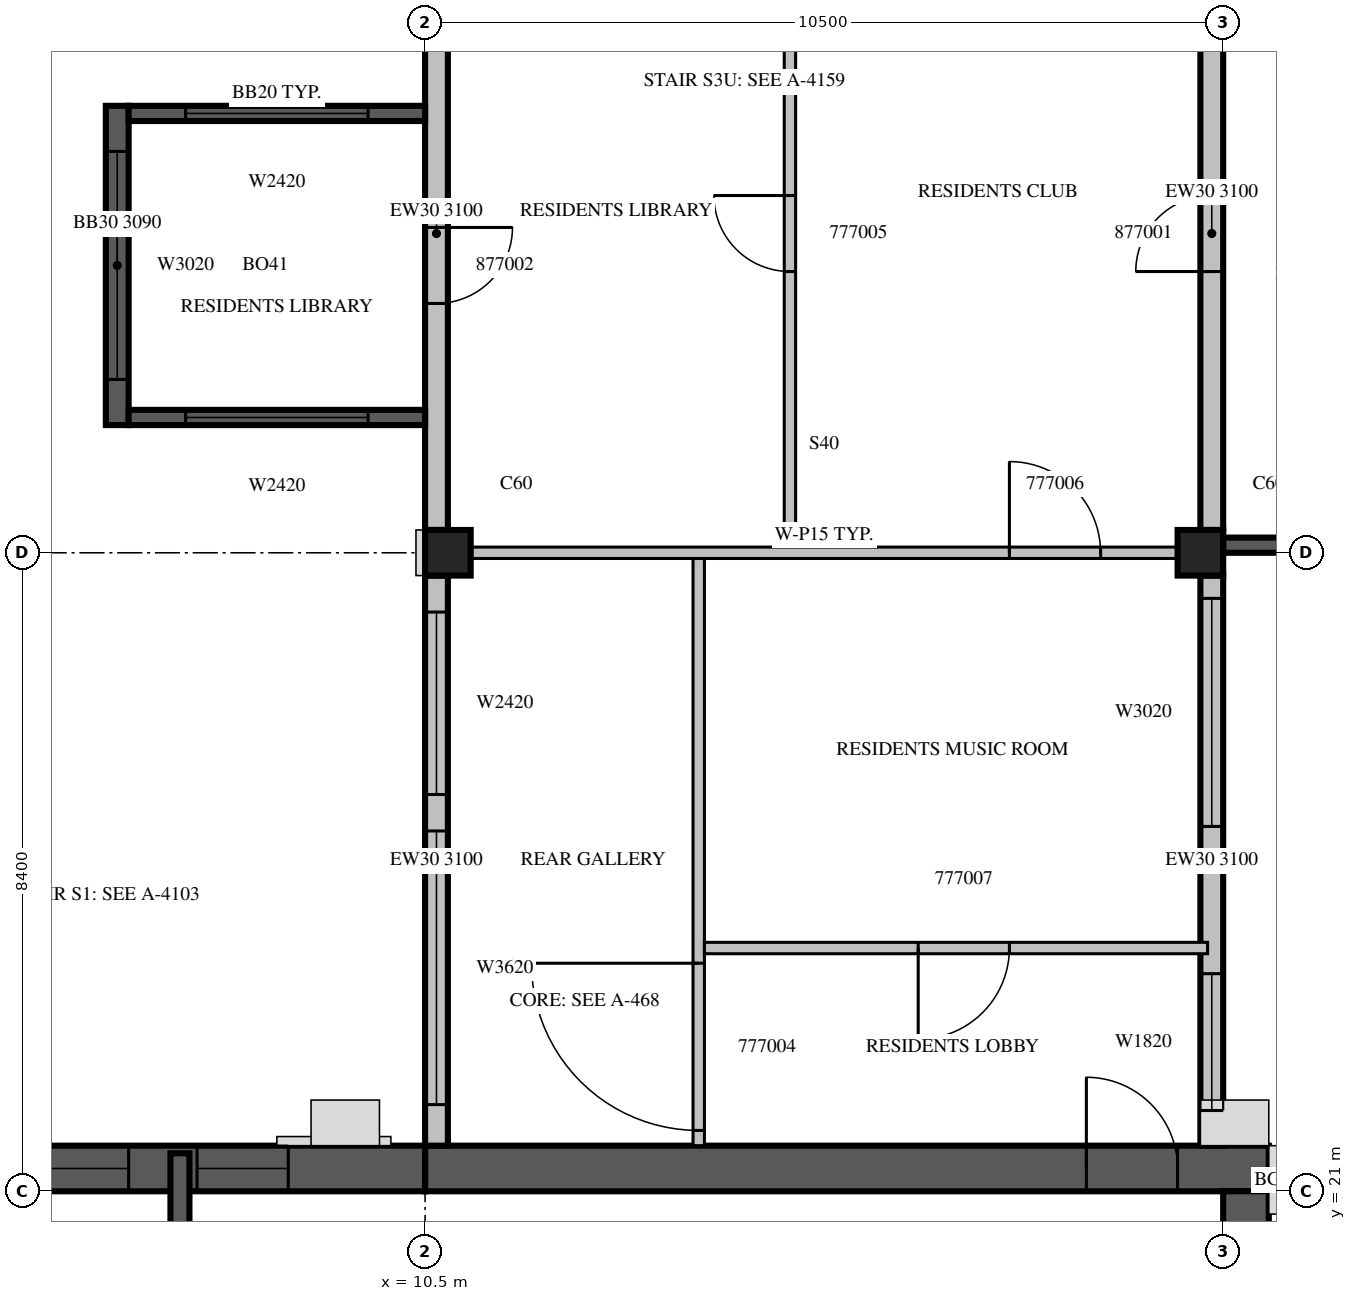
"""IFC4 building model, lengths in metres.
Left out: names, types, materials, properties, quantities, classifications, styles, units other than length and angle.
Written with IfcOpenShell. Run it as: python <this file> out.ifc"""

import sys

from ifc_helpers import new_model, si_unit, direction, frame, frame_2d, origin, origin_2d, place, context, subcontext, project, spatial, rectangle, extrude, source, transform, mapped, element, fill, save


model = new_model("IFC4")
c1 = context("Model", 3, precision=1e-05, world=origin(), true_north=direction((0.0, 1.0)))
c2 = subcontext(c1, "Body", "Model", "MODEL_VIEW")
j1 = project(units=[si_unit("LENGTHUNIT", "METRE"), si_unit("PLANEANGLEUNIT", "RADIAN")], contexts=[c1])
p1 = place(None, origin())
s1 = spatial("IfcSite", under=j1, at=p1, CompositionType="ELEMENT")
p2 = place(p1, origin())
s2 = spatial("IfcBuilding", under=s1, at=p2, CompositionType="ELEMENT")
p3 = place(p2, frame((0.0, 0.0, 330.0)))
s3 = spatial("IfcBuildingStorey", under=s2, at=p3, CompositionType="ELEMENT", Elevation=330.0)
m1 = source(origin(), c2, "Body", "SweptSolid", [
    extrude(rectangle(XDim=0.6, YDim=0.6, at=origin_2d()), origin(), (0.0, 0.0, 1.0), 3.5),
])
for number, where, z_axis, x_axis in (
    (1, (10.8, 29.4, 0.0), (0.0, 0.0, 1.0), (1.0, 0.0, 0.0)),
    (2, (20.7, 29.4, 0.0), (0.0, 0.0, 1.0), (1.0, 0.0, 0.0)),
):
    element("IfcColumn", number, at=place(p3, frame(where, z_axis=z_axis, x_axis=x_axis)), inside=s3, PredefinedType="COLUMN", context=c2, shape_type="MappedRepresentation", body=[
        mapped(m1, transform((0.0, 0.0, 0.0), scale=1.0)),
    ])
m2 = source(origin(), c2, "Body", "SweptSolid", [
    extrude(rectangle(XDim=11.1, YDim=0.6, at=frame_2d((5.55, 0.0))), origin(), (0.0, 0.0, 1.0), 3.5),
])
p4 = place(p3, frame((10.5, 21.3, 0.0), z_axis=(0.0, 0.0, 1.0), x_axis=(1.0, 0.0, 0.0)))
e3 = element("IfcWall", 3, at=p4, inside=s3, PredefinedType="SHEAR", context=c2, shape_type="MappedRepresentation", body=[
    mapped(m2, transform((0.0, 0.0, 0.0), scale=1.0)),
])
m3 = source(origin(), c2, "Body", "SweptSolid", [
    extrude(rectangle(XDim=1.2, YDim=2.1, at=frame_2d((0.6, 1.05))), frame((0.0, 0.31, 0.0), z_axis=(0.0, -1.0, 0.0), x_axis=(1.0, 0.0, 0.0)), (0.0, 0.0, 1.0), 0.62),
])
p5 = place(p4, frame((8.7, 0.0, 0.0)))
e4 = element("IfcOpeningElement", 4, at=p5, cuts=e3, PredefinedType="OPENING", context=c2, shape_type="MappedRepresentation", body=[
    mapped(m3, transform((0.0, 0.0, 0.0), scale=1.0)),
])
m4 = source(origin(), c2, "Body", "SweptSolid", [
    extrude(rectangle(XDim=10.5, YDim=0.6, at=frame_2d((5.25, 0.0))), origin(), (0.0, 0.0, 1.0), 3.5),
])
p6 = place(p3, frame((21.3, 10.5, 0.0), z_axis=(0.0, 0.0, 1.0), x_axis=(0.0, 1.0, 0.0)))
e5 = element("IfcWall", 5, at=p6, inside=s3, PredefinedType="SHEAR", context=c2, shape_type="MappedRepresentation", body=[
    mapped(m4, transform((0.0, 0.0, 0.0), scale=1.0)),
])
m5 = source(origin(), c2, "Body", "SweptSolid", [
    extrude(rectangle(XDim=1.2, YDim=2.4, at=frame_2d((0.6, 1.2))), frame((0.0, 0.31, 0.0), z_axis=(0.0, -1.0, 0.0), x_axis=(1.0, 0.0, 0.0)), (0.0, 0.0, 1.0), 0.62),
])
p7 = place(p6, frame((5.7, 0.0, 0.6)))
e6 = element("IfcOpeningElement", 6, at=p7, cuts=e5, PredefinedType="OPENING", context=c2, shape_type="MappedRepresentation", body=[
    mapped(m5, transform((0.0, 0.0, 0.0), scale=1.0)),
])
m6 = source(origin(), c2, "Body", "SweptSolid", [
    extrude(rectangle(XDim=6.6, YDim=0.6, at=frame_2d((3.3, 0.0))), origin(), (0.0, 0.0, 1.0), 3.5),
])
p8 = place(p3, frame((3.9, 21.3, 0.0), z_axis=(0.0, 0.0, 1.0), x_axis=(1.0, 0.0, 0.0)))
e7 = element("IfcWall", 7, at=p8, inside=s3, PredefinedType="SHEAR", context=c2, shape_type="MappedRepresentation", body=[
    mapped(m6, transform((0.0, 0.0, 0.0), scale=1.0)),
])
p9 = place(p8, frame((1.5, 0.0, 0.6)))
e8 = element("IfcOpeningElement", 8, at=p9, cuts=e7, PredefinedType="OPENING", context=c2, shape_type="MappedRepresentation", body=[
    mapped(m5, transform((0.0, 0.0, 0.0), scale=1.0)),
])
p10 = place(p8, frame((3.6, 0.0, 0.6)))
e9 = element("IfcOpeningElement", 9, at=p10, cuts=e7, PredefinedType="OPENING", context=c2, shape_type="MappedRepresentation", body=[
    mapped(m5, transform((0.0, 0.0, 0.0), scale=1.0)),
])
m7 = source(origin(), c2, "Body", "SweptSolid", [
    extrude(rectangle(XDim=7.5, YDim=0.3, at=frame_2d((3.75, 0.0))), origin(), (0.0, 0.0, 1.0), 3.1),
])
p11 = place(p3, frame((20.85, 21.6, 0.0), z_axis=(0.0, 0.0, 1.0), x_axis=(0.0, 1.0, 0.0)))
e10 = element("IfcWall", 10, at=p11, inside=s3, PredefinedType="STANDARD", context=c2, shape_type="MappedRepresentation", body=[
    mapped(m7, transform((0.0, 0.0, 0.0), scale=1.0)),
])
m8 = source(origin(), c2, "Body", "SweptSolid", [
    extrude(rectangle(XDim=1.8, YDim=2.0, at=frame_2d((0.9, 1.0))), frame((0.0, 0.16, 0.0), z_axis=(0.0, -1.0, 0.0), x_axis=(1.0, 0.0, 0.0)), (0.0, 0.0, 1.0), 0.32),
])
p12 = place(p11, frame((0.463, 0.0, 0.6)))
e11 = element("IfcOpeningElement", 11, at=p12, cuts=e10, PredefinedType="OPENING", context=c2, shape_type="MappedRepresentation", body=[
    mapped(m8, transform((0.0, 0.0, 0.0), scale=1.0)),
])
m9 = source(origin(), c2, "Body", "SweptSolid", [
    extrude(rectangle(XDim=3.0, YDim=2.0, at=frame_2d((1.5, 1.0))), frame((0.0, 0.16, 0.0), z_axis=(0.0, -1.0, 0.0), x_axis=(1.0, 0.0, 0.0)), (0.0, 0.0, 1.0), 0.32),
])
p13 = place(p11, frame((4.2, 0.0, 0.6)))
e12 = element("IfcOpeningElement", 12, at=p13, cuts=e10, PredefinedType="OPENING", context=c2, shape_type="MappedRepresentation", body=[
    mapped(m9, transform((0.0, 0.0, 0.0), scale=1.0)),
])
m10 = source(origin(), c2, "Body", "SweptSolid", [
    extrude(rectangle(XDim=7.8, YDim=0.3, at=frame_2d((3.9, 0.0))), origin(), (0.0, 0.0, 1.0), 3.1),
])
p14 = place(p3, frame((20.85, 29.7, 0.0), z_axis=(0.0, 0.0, 1.0), x_axis=(0.0, 1.0, 0.0)))
e13 = element("IfcWall", 13, at=p14, inside=s3, PredefinedType="STANDARD", context=c2, shape_type="MappedRepresentation", body=[
    mapped(m10, transform((0.0, 0.0, 0.0), scale=1.0)),
])
m11 = source(origin(), c2, "Body", "SweptSolid", [
    extrude(rectangle(XDim=1.0, YDim=2.1, at=frame_2d((0.5, 1.05))), frame((0.0, 0.16, 0.0), z_axis=(0.0, -1.0, 0.0), x_axis=(1.0, 0.0, 0.0)), (0.0, 0.0, 1.0), 0.32),
])
p15 = place(p14, frame((3.4, 0.0, 0.0)))
e14 = element("IfcOpeningElement", 14, at=p15, cuts=e13, PredefinedType="OPENING", context=c2, shape_type="MappedRepresentation", body=[
    mapped(m11, transform((0.0, 0.0, 0.0), scale=1.0)),
])
p16 = place(p3, frame((10.65, 37.5, 0.0), z_axis=(0.0, 0.0, 1.0), x_axis=(0.0, -1.0, 0.0)))
e15 = element("IfcWall", 15, at=p16, inside=s3, PredefinedType="STANDARD", context=c2, shape_type="MappedRepresentation", body=[
    mapped(m10, transform((0.0, 0.0, 0.0), scale=1.0)),
])
p17 = place(p16, frame((3.82, 0.0, 0.0)))
e16 = element("IfcOpeningElement", 16, at=p17, cuts=e15, PredefinedType="OPENING", context=c2, shape_type="MappedRepresentation", body=[
    mapped(m11, transform((0.0, 0.0, 0.0), scale=1.0)),
])
p18 = place(p3, frame((10.65, 29.1, 0.0), z_axis=(0.0, 0.0, 1.0), x_axis=(0.0, -1.0, 0.0)))
e17 = element("IfcWall", 17, at=p18, inside=s3, PredefinedType="STANDARD", context=c2, shape_type="MappedRepresentation", body=[
    mapped(m7, transform((0.0, 0.0, 0.0), scale=1.0)),
])
m12 = source(origin(), c2, "Body", "SweptSolid", [
    extrude(rectangle(XDim=3.6, YDim=2.0, at=frame_2d((1.8, 1.0))), frame((0.0, 0.16, 0.0), z_axis=(0.0, -1.0, 0.0), x_axis=(1.0, 0.0, 0.0)), (0.0, 0.0, 1.0), 0.32),
])
p19 = place(p18, frame((3.36, 0.0, 0.6)))
e18 = element("IfcOpeningElement", 18, at=p19, cuts=e17, PredefinedType="OPENING", context=c2, shape_type="MappedRepresentation", body=[
    mapped(m12, transform((0.0, 0.0, 0.0), scale=1.0)),
])
m13 = source(origin(), c2, "Body", "SweptSolid", [
    extrude(rectangle(XDim=2.4, YDim=2.0, at=frame_2d((1.2, 1.0))), frame((0.0, 0.16, 0.0), z_axis=(0.0, -1.0, 0.0), x_axis=(1.0, 0.0, 0.0)), (0.0, 0.0, 1.0), 0.32),
])
p20 = place(p18, frame((0.48, 0.0, 0.6)))
e19 = element("IfcOpeningElement", 19, at=p20, cuts=e17, PredefinedType="OPENING", context=c2, shape_type="MappedRepresentation", body=[
    mapped(m13, transform((0.0, 0.0, 0.0), scale=1.0)),
])
m14 = source(origin(), c2, "Body", "SweptSolid", [
    extrude(rectangle(XDim=3.9, YDim=0.2, at=frame_2d((1.95, 0.0))), origin(), (0.0, 0.0, 1.0), 3.09),
])
p21 = place(p3, frame((21.0, 29.5, 0.0), z_axis=(0.0, 0.0, 1.0), x_axis=(1.0, 0.0, 0.0)))
e20 = element("IfcWall", 20, at=p21, inside=s3, PredefinedType="SOLIDWALL", context=c2, shape_type="MappedRepresentation", body=[
    mapped(m14, transform((0.0, 0.0, 0.0), scale=1.0)),
])
m15 = source(origin(), c2, "Body", "SweptSolid", [
    extrude(rectangle(XDim=2.4, YDim=2.0, at=frame_2d((1.2, 1.0))), frame((0.0, 0.11, 0.0), z_axis=(0.0, -1.0, 0.0), x_axis=(1.0, 0.0, 0.0)), (0.0, 0.0, 1.0), 0.22),
])
p22 = place(p21, frame((0.75, 0.0, 0.6)))
e21 = element("IfcOpeningElement", 21, at=p22, cuts=e20, PredefinedType="OPENING", context=c2, shape_type="MappedRepresentation", body=[
    mapped(m15, transform((0.0, 0.0, 0.0), scale=1.0)),
])
m16 = source(origin(), c2, "Body", "SweptSolid", [
    extrude(rectangle(XDim=4.2, YDim=0.3, at=frame_2d((2.1, 0.0))), origin(), (0.0, 0.0, 1.0), 3.09),
])
p23 = place(p3, frame((6.45, 35.28, 0.0), z_axis=(0.0, 0.0, 1.0), x_axis=(0.0, -1.0, 0.0)))
e22 = element("IfcWall", 22, at=p23, inside=s3, PredefinedType="SOLIDWALL", context=c2, shape_type="MappedRepresentation", body=[
    mapped(m16, transform((0.0, 0.0, 0.0), scale=1.0)),
])
p24 = place(p23, frame((0.6, 0.0, 0.6)))
e23 = element("IfcOpeningElement", 23, at=p24, cuts=e22, PredefinedType="OPENING", context=c2, shape_type="MappedRepresentation", body=[
    mapped(m9, transform((0.0, 0.0, 0.0), scale=1.0)),
])
p25 = place(p3, frame((10.5, 35.18, 0.0), z_axis=(0.0, 0.0, 1.0), x_axis=(-1.0, 0.0, 0.0)))
e24 = element("IfcWall", 24, at=p25, inside=s3, PredefinedType="SOLIDWALL", context=c2, shape_type="MappedRepresentation", body=[
    mapped(m14, transform((0.0, 0.0, 0.0), scale=1.0)),
])
p26 = place(p25, frame((0.75, 0.0, 0.6)))
e25 = element("IfcOpeningElement", 25, at=p26, cuts=e24, PredefinedType="OPENING", context=c2, shape_type="MappedRepresentation", body=[
    mapped(m15, transform((0.0, 0.0, 0.0), scale=1.0)),
])
p27 = place(p3, frame((10.5, 31.18, 0.0), z_axis=(0.0, 0.0, 1.0), x_axis=(-1.0, 0.0, 0.0)))
e26 = element("IfcWall", 26, at=p27, inside=s3, PredefinedType="SOLIDWALL", context=c2, shape_type="MappedRepresentation", body=[
    mapped(m14, transform((0.0, 0.0, 0.0), scale=1.0)),
])
p28 = place(p27, frame((0.75, 0.0, 0.6)))
e27 = element("IfcOpeningElement", 27, at=p28, cuts=e26, PredefinedType="OPENING", context=c2, shape_type="MappedRepresentation", body=[
    mapped(m15, transform((0.0, 0.0, 0.0), scale=1.0)),
])
m17 = source(origin(), c2, "Body", "SweptSolid", [
    extrude(rectangle(XDim=6.6, YDim=0.25, at=frame_2d((3.3, 0.0))), origin(), (0.0, 0.0, 1.0), 3.1),
])
p29 = place(p3, frame((7.275, 14.9, 0.0), z_axis=(0.0, 0.0, 1.0), x_axis=(0.0, 1.0, 0.0)))
e28 = element("IfcWall", 28, at=p29, inside=s3, PredefinedType="SOLIDWALL", context=c2, shape_type="MappedRepresentation", body=[
    mapped(m17, transform((0.0, 0.0, 0.0), scale=1.0)),
])
m18 = source(origin(), c2, "Body", "SweptSolid", [
    extrude(rectangle(XDim=1.1, YDim=2.1, at=frame_2d((0.55, 1.05))), frame((0.0, 0.135, 0.0), z_axis=(0.0, -1.0, 0.0), x_axis=(1.0, 0.0, 0.0)), (0.0, 0.0, 1.0), 0.27),
])
p30 = place(p29, frame((0.15, 0.0, 0.0)))
e29 = element("IfcOpeningElement", 29, at=p30, cuts=e28, PredefinedType="OPENING", context=c2, shape_type="MappedRepresentation", body=[
    mapped(m18, transform((0.0, 0.0, 0.0), scale=1.0)),
])
m19 = source(origin(), c2, "Body", "SweptSolid", [
    extrude(rectangle(XDim=7.725, YDim=0.15, at=frame_2d((3.862, 0.0))), origin(), (0.0, 0.0, 1.0), 3.1),
])
p31 = place(p3, frame((14.1, 29.325, 0.0), z_axis=(0.0, 0.0, 1.0), x_axis=(0.0, -1.0, 0.0)))
e30 = element("IfcWall", 30, at=p31, inside=s3, PredefinedType="PARTITIONING", context=c2, shape_type="MappedRepresentation", body=[
    mapped(m19, transform((0.0, 0.0, 0.0), scale=1.0)),
])
m20 = source(origin(), c2, "Body", "SweptSolid", [
    extrude(rectangle(XDim=2.2, YDim=2.1, at=frame_2d((1.1, 1.05))), frame((0.0, 0.085, 0.0), z_axis=(0.0, -1.0, 0.0), x_axis=(1.0, 0.0, 0.0)), (0.0, 0.0, 1.0), 0.17),
])
p32 = place(p31, frame((5.325, 0.0, 0.0)))
e31 = element("IfcOpeningElement", 31, at=p32, cuts=e30, PredefinedType="OPENING", context=c2, shape_type="MappedRepresentation", body=[
    mapped(m20, transform((0.0, 0.0, 0.0), scale=1.0)),
])
p33 = place(p3, frame((14.175, 24.2, 0.0), z_axis=(0.0, 0.0, 1.0), x_axis=(1.0, 0.0, 0.0)))
e32 = element("IfcWall", 32, at=p33, inside=s3, PredefinedType="PARTITIONING", context=c2, shape_type="SweptSolid", body=[
    extrude(rectangle(XDim=6.62, YDim=0.15, at=frame_2d((3.31, 0.0))), origin(), (0.0, 0.0, 1.0), 3.1),
])
m21 = source(origin(), c2, "Body", "SweptSolid", [
    extrude(rectangle(XDim=1.2, YDim=2.1, at=frame_2d((0.6, 1.05))), frame((0.0, 0.085, 0.0), z_axis=(0.0, -1.0, 0.0), x_axis=(1.0, 0.0, 0.0)), (0.0, 0.0, 1.0), 0.17),
])
p34 = place(p33, frame((2.812, 0.0, 0.0)))
e33 = element("IfcOpeningElement", 33, at=p34, cuts=e32, PredefinedType="OPENING", context=c2, shape_type="MappedRepresentation", body=[
    mapped(m21, transform((0.0, 0.0, 0.0), scale=1.0)),
])
p35 = place(p3, frame((15.3, 37.725, 0.0), z_axis=(0.0, 0.0, 1.0), x_axis=(0.0, -1.0, 0.0)))
e34 = element("IfcWall", 34, at=p35, inside=s3, PredefinedType="PARTITIONING", context=c2, shape_type="SweptSolid", body=[
    extrude(rectangle(XDim=8.325, YDim=0.15, at=frame_2d((4.162, 0.0))), origin(), (0.0, 0.0, 1.0), 3.1),
])
m22 = source(origin(), c2, "Body", "SweptSolid", [
    extrude(rectangle(XDim=1.0, YDim=2.1, at=frame_2d((0.5, 1.05))), frame((0.0, 0.085, 0.0), z_axis=(0.0, -1.0, 0.0), x_axis=(1.0, 0.0, 0.0)), (0.0, 0.0, 1.0), 0.17),
])
p36 = place(p35, frame((3.625, 0.0, 0.0)))
e35 = element("IfcOpeningElement", 35, at=p36, cuts=e34, PredefinedType="OPENING", context=c2, shape_type="MappedRepresentation", body=[
    mapped(m22, transform((0.0, 0.0, 0.0), scale=1.0)),
])
p37 = place(p3, frame((11.099, 29.4, 0.0), z_axis=(0.0, 0.0, 1.0), x_axis=(1.0, 0.0, 0.0)))
e36 = element("IfcWall", 36, at=p37, inside=s3, PredefinedType="PARTITIONING", context=c2, shape_type="SweptSolid", body=[
    extrude(rectangle(XDim=9.302, YDim=0.15, at=frame_2d((4.651, 0.0))), origin(), (0.0, 0.0, 1.0), 3.1),
])
p38 = place(p37, frame((7.088, 0.0, 0.0)))
e37 = element("IfcOpeningElement", 37, at=p38, cuts=e36, PredefinedType="OPENING", context=c2, shape_type="MappedRepresentation", body=[
    mapped(m21, transform((0.0, 0.0, 0.0), scale=1.0)),
])
m23 = source(origin(), c2, "Body", "SweptSolid", [
    extrude(rectangle(XDim=1.8, YDim=2.0, at=frame_2d((0.9, 1.0))), frame((0.0, 0.03, 0.0), z_axis=(0.0, -1.0, 0.0), x_axis=(1.0, 0.0, 0.0)), (0.0, 0.0, 1.0), 0.06),
])
p39 = place(p12, origin())
e38 = element("IfcWindow", 38, at=p39, inside=s3, PartitioningType="SINGLE_PANEL", PredefinedType="WINDOW", context=c2, shape_type="MappedRepresentation", body=[
    mapped(m23, transform((0.0, 0.0, 0.0), scale=1.0)),
])
fill(e11, e38)
m24 = source(origin(), c2, "Body", "SweptSolid", [
    extrude(rectangle(XDim=3.0, YDim=2.0, at=frame_2d((1.5, 1.0))), frame((0.0, 0.03, 0.0), z_axis=(0.0, -1.0, 0.0), x_axis=(1.0, 0.0, 0.0)), (0.0, 0.0, 1.0), 0.06),
])
p40 = place(p13, origin())
e39 = element("IfcWindow", 39, at=p40, inside=s3, PartitioningType="SINGLE_PANEL", PredefinedType="WINDOW", context=c2, shape_type="MappedRepresentation", body=[
    mapped(m24, transform((0.0, 0.0, 0.0), scale=1.0)),
])
fill(e12, e39)
m25 = source(origin(), c2, "Body", "SweptSolid", [
    extrude(rectangle(XDim=3.6, YDim=2.0, at=frame_2d((1.8, 1.0))), frame((0.0, 0.03, 0.0), z_axis=(0.0, -1.0, 0.0), x_axis=(1.0, 0.0, 0.0)), (0.0, 0.0, 1.0), 0.06),
])
p41 = place(p19, origin())
e40 = element("IfcWindow", 40, at=p41, inside=s3, PartitioningType="SINGLE_PANEL", PredefinedType="WINDOW", context=c2, shape_type="MappedRepresentation", body=[
    mapped(m25, transform((0.0, 0.0, 0.0), scale=1.0)),
])
fill(e18, e40)
m26 = source(origin(), c2, "Body", "SweptSolid", [
    extrude(rectangle(XDim=2.4, YDim=2.0, at=frame_2d((1.2, 1.0))), frame((0.0, 0.03, 0.0), z_axis=(0.0, -1.0, 0.0), x_axis=(1.0, 0.0, 0.0)), (0.0, 0.0, 1.0), 0.06),
])
p42 = place(p20, origin())
e41 = element("IfcWindow", 41, at=p42, inside=s3, PartitioningType="SINGLE_PANEL", PredefinedType="WINDOW", context=c2, shape_type="MappedRepresentation", body=[
    mapped(m26, transform((0.0, 0.0, 0.0), scale=1.0)),
])
fill(e19, e41)
p43 = place(p24, origin())
e42 = element("IfcWindow", 42, at=p43, inside=s3, PartitioningType="SINGLE_PANEL", PredefinedType="WINDOW", context=c2, shape_type="MappedRepresentation", body=[
    mapped(m24, transform((0.0, 0.0, 0.0), scale=1.0)),
])
fill(e23, e42)
p44 = place(p26, origin())
e43 = element("IfcWindow", 43, at=p44, inside=s3, PartitioningType="SINGLE_PANEL", PredefinedType="WINDOW", context=c2, shape_type="MappedRepresentation", body=[
    mapped(m26, transform((0.0, 0.0, 0.0), scale=1.0)),
])
fill(e25, e43)
p45 = place(p28, origin())
e44 = element("IfcWindow", 44, at=p45, inside=s3, PartitioningType="SINGLE_PANEL", PredefinedType="WINDOW", context=c2, shape_type="MappedRepresentation", body=[
    mapped(m26, transform((0.0, 0.0, 0.0), scale=1.0)),
])
fill(e27, e44)
m27 = source(origin(), c2, "Body", "SweptSolid", [
    extrude(rectangle(XDim=1.2, YDim=2.1, at=frame_2d((0.6, 1.05))), frame((0.0, 0.025, 0.0), z_axis=(0.0, -1.0, 0.0), x_axis=(1.0, 0.0, 0.0)), (0.0, 0.0, 1.0), 0.05),
])
p46 = place(p5, origin())
e45 = element("IfcDoor", 45, at=p46, inside=s3, OperationType="SINGLE_SWING_LEFT", PredefinedType="DOOR", context=c2, shape_type="MappedRepresentation", body=[
    mapped(m27, transform((0.0, 0.0, 0.0), scale=1.0)),
])
fill(e4, e45)
m28 = source(origin(), c2, "Body", "SweptSolid", [
    extrude(rectangle(XDim=1.2, YDim=2.4, at=frame_2d((0.6, 1.2))), frame((0.0, 0.03, 0.0), z_axis=(0.0, -1.0, 0.0), x_axis=(1.0, 0.0, 0.0)), (0.0, 0.0, 1.0), 0.06),
])
p47 = place(p9, origin())
e46 = element("IfcWindow", 46, at=p47, inside=s3, PartitioningType="SINGLE_PANEL", PredefinedType="WINDOW", context=c2, shape_type="MappedRepresentation", body=[
    mapped(m28, transform((0.0, 0.0, 0.0), scale=1.0)),
])
fill(e8, e46)
p48 = place(p10, origin())
e47 = element("IfcWindow", 47, at=p48, inside=s3, PartitioningType="SINGLE_PANEL", PredefinedType="WINDOW", context=c2, shape_type="MappedRepresentation", body=[
    mapped(m28, transform((0.0, 0.0, 0.0), scale=1.0)),
])
fill(e9, e47)
m29 = source(origin(), c2, "Body", "SweptSolid", [
    extrude(rectangle(XDim=2.2, YDim=2.1, at=frame_2d((1.1, 1.05))), frame((0.0, 0.025, 0.0), z_axis=(0.0, -1.0, 0.0), x_axis=(1.0, 0.0, 0.0)), (0.0, 0.0, 1.0), 0.05),
])
p49 = place(p32, origin())
e48 = element("IfcDoor", 48, at=p49, inside=s3, OperationType="DOUBLE_DOOR_SINGLE_SWING", PredefinedType="DOOR", context=c2, shape_type="MappedRepresentation", body=[
    mapped(m29, transform((0.0, 0.0, 0.0), scale=1.0)),
])
fill(e31, e48)
m30 = source(origin(), c2, "Body", "SweptSolid", [
    extrude(rectangle(XDim=1.0, YDim=2.1, at=frame_2d((0.5, 1.05))), frame((0.0, 0.025, 0.0), z_axis=(0.0, -1.0, 0.0), x_axis=(1.0, 0.0, 0.0)), (0.0, 0.0, 1.0), 0.05),
])
p50 = place(p36, origin())
e49 = element("IfcDoor", 49, at=p50, inside=s3, OperationType="SINGLE_SWING_RIGHT", PredefinedType="DOOR", context=c2, shape_type="MappedRepresentation", body=[
    mapped(m30, transform((0.0, 0.0, 0.0), scale=1.0)),
])
fill(e35, e49)
p51 = place(p38, origin())
e50 = element("IfcDoor", 50, at=p51, inside=s3, OperationType="SINGLE_SWING_LEFT", PredefinedType="DOOR", context=c2, shape_type="MappedRepresentation", body=[
    mapped(m27, transform((0.0, 0.0, 0.0), scale=1.0)),
])
fill(e37, e50)
p52 = place(p34, origin())
e51 = element("IfcDoor", 51, at=p52, inside=s3, OperationType="SINGLE_SWING_RIGHT", PredefinedType="DOOR", context=c2, shape_type="MappedRepresentation", body=[
    mapped(m27, transform((0.0, 0.0, 0.0), scale=1.0)),
])
fill(e33, e51)
p53 = place(p15, origin())
e52 = element("IfcDoor", 52, at=p53, inside=s3, OperationType="SINGLE_SWING_LEFT", PredefinedType="DOOR", context=c2, shape_type="MappedRepresentation", body=[
    mapped(m30, transform((0.0, 0.0, 0.0), scale=1.0)),
])
fill(e14, e52)
p54 = place(p17, origin())
e53 = element("IfcDoor", 53, at=p54, inside=s3, OperationType="SINGLE_SWING_LEFT", PredefinedType="DOOR", context=c2, shape_type="MappedRepresentation", body=[
    mapped(m30, transform((0.0, 0.0, 0.0), scale=1.0)),
])
fill(e16, e53)
save(model, sys.argv[1])
